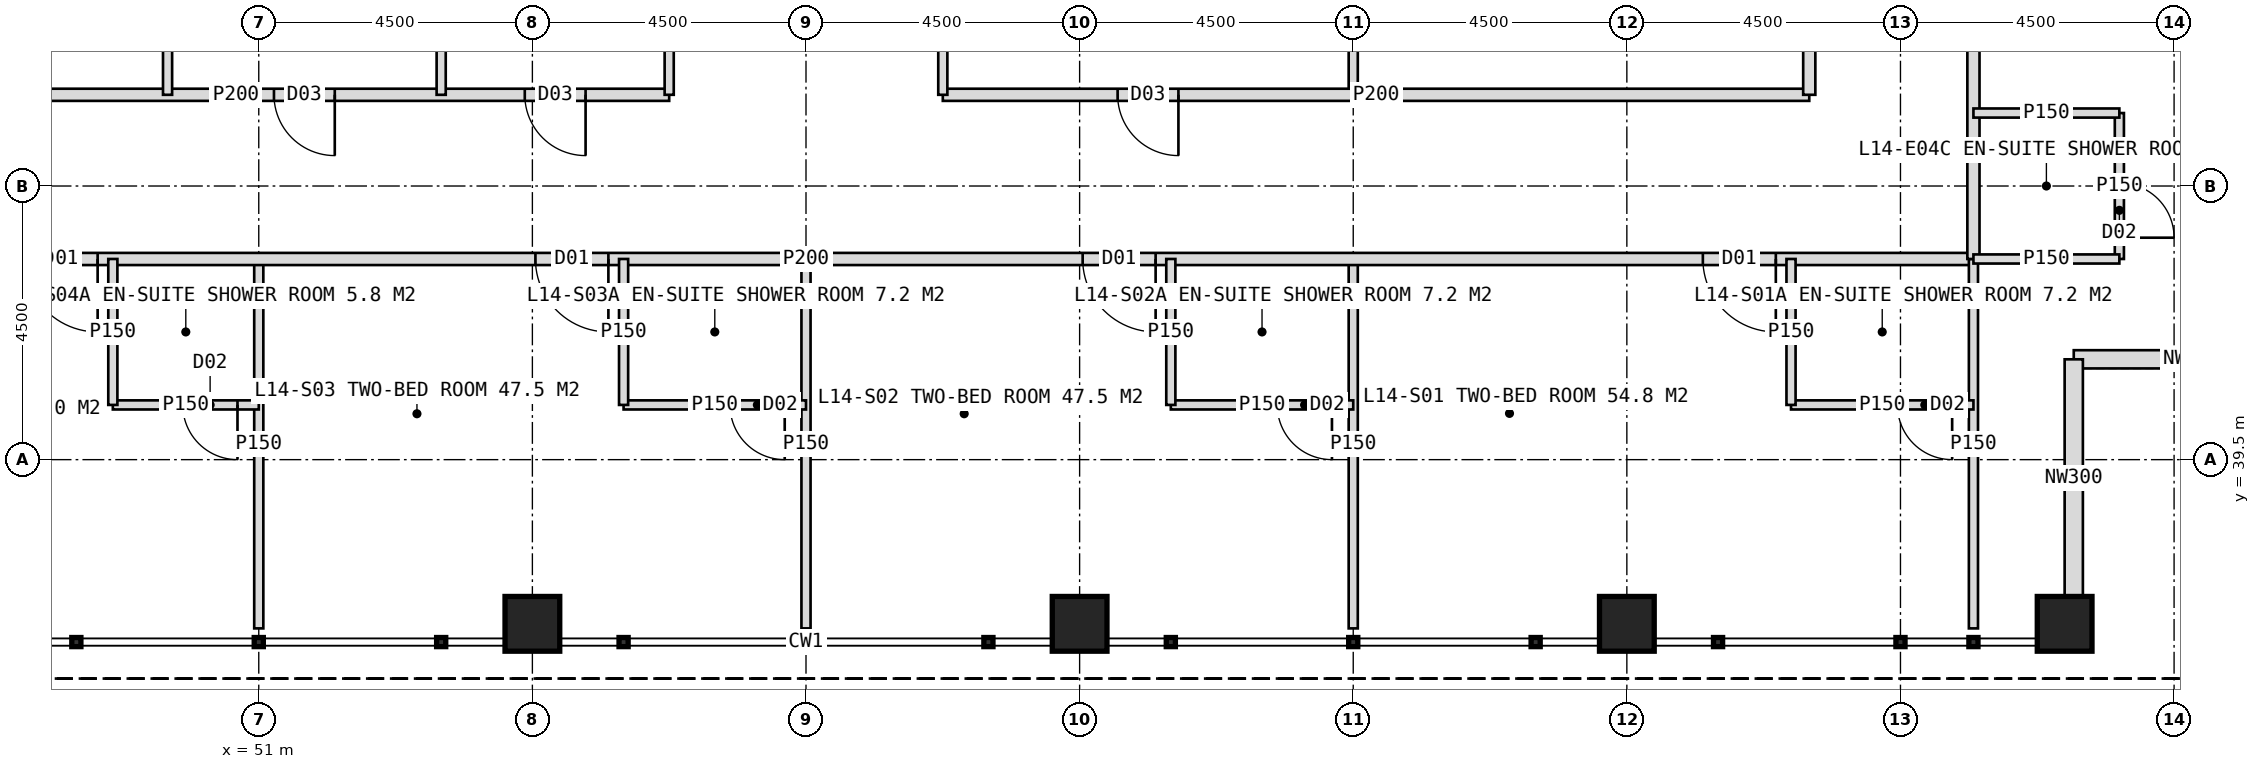
"""IFC4 building model, lengths in metres.
Left out: names, types, materials, properties, quantities, classifications, styles, units other than length and angle.
Written with IfcOpenShell. Run it as: python <this file> out.ifc"""

import sys

from ifc_helpers import new_model, si_unit, direction, frame, frame_2d, origin, origin_2d, place, context, subcontext, project, spatial, rectangle, hollow_rectangle, extrude, element, fill, save


model = new_model("IFC4")
c1 = context("Model", 3, precision=1e-05, world=origin(), true_north=direction((0.0, 1.0)))
c2 = subcontext(c1, "Body", "Model", "MODEL_VIEW")
j1 = project(units=[si_unit("LENGTHUNIT", "METRE"), si_unit("PLANEANGLEUNIT", "RADIAN")], contexts=[c1])
p1 = place(None, origin())
s1 = spatial("IfcSite", under=j1, at=p1, CompositionType="ELEMENT")
p2 = place(p1, origin())
s2 = spatial("IfcBuilding", under=s1, at=p2, CompositionType="ELEMENT")
p3 = place(p2, frame((0.0, 0.0, 63.0)))
s3 = spatial("IfcBuildingStorey", under=s2, at=p3, CompositionType="ELEMENT", Elevation=63.0)
for number, where, z_axis, x_axis in (
    (1, (55.5, 36.8, 0.0), (0.0, 0.0, 1.0), (1.0, 0.0, 0.0)),
    (2, (64.5, 36.8, 0.0), (0.0, 0.0, 1.0), (1.0, 0.0, 0.0)),
    (3, (73.5, 36.8, 0.0), (0.0, 0.0, 1.0), (1.0, 0.0, 0.0)),
    (4, (80.7, 36.8, 0.0), (0.0, 0.0, 1.0), (1.0, 0.0, 0.0)),
):
    element("IfcColumn", number, at=place(p3, frame(where, z_axis=z_axis, x_axis=x_axis)), inside=s3, PredefinedType="COLUMN", context=c2, shape_type="SweptSolid", body=[
        extrude(hollow_rectangle(XDim=0.9, YDim=0.9, WallThickness=0.08, at=origin_2d()), origin(), (0.0, 0.0, 1.0), 4.0),
    ])
for number, where, z_axis, x_axis in (
    (5, (84.75, 41.15, 0.0), (0.0, 0.0, 1.0), (-1.0, 0.0, 0.0)),
    (6, (80.85, 41.15, 0.0), (0.0, 0.0, 1.0), (0.0, -1.0, 0.0)),
):
    element("IfcWall", number, at=place(p3, frame(where, z_axis=z_axis, x_axis=x_axis)), inside=s3, PredefinedType="ELEMENTEDWALL", context=c2, shape_type="SweptSolid", body=[
        extrude(rectangle(XDim=3.9, YDim=0.3, at=frame_2d((1.95, 0.0))), origin(), (0.0, 0.0, 1.0), 2.95),
    ])
p4 = place(p3, frame((69.0, 42.8, 0.0), z_axis=(0.0, 0.0, 1.0), x_axis=(0.0, -1.0, 0.0)))
e7 = element("IfcWall", 7, at=p4, inside=s3, PredefinedType="PARTITIONING", context=c2, shape_type="SweptSolid", body=[
    extrude(rectangle(XDim=6.075, YDim=0.15, at=frame_2d((3.038, 0.0))), origin(), (0.0, 0.0, 1.0), 3.75),
])
p5 = place(p3, frame((60.0, 42.8, 0.0), z_axis=(0.0, 0.0, 1.0), x_axis=(0.0, -1.0, 0.0)))
e8 = element("IfcWall", 8, at=p5, inside=s3, PredefinedType="PARTITIONING", context=c2, shape_type="SweptSolid", body=[
    extrude(rectangle(XDim=6.075, YDim=0.15, at=frame_2d((3.038, 0.0))), origin(), (0.0, 0.0, 1.0), 2.75),
])
p6 = place(p3, frame((51.0, 42.8, 0.0), z_axis=(0.0, 0.0, 1.0), x_axis=(0.0, -1.0, 0.0)))
e9 = element("IfcWall", 9, at=p6, inside=s3, PredefinedType="PARTITIONING", context=c2, shape_type="SweptSolid", body=[
    extrude(rectangle(XDim=6.075, YDim=0.15, at=frame_2d((3.038, 0.0))), origin(), (0.0, 0.0, 1.0), 3.75),
])
p7 = place(p3, frame((79.2, 42.8, 0.0), z_axis=(0.0, 0.0, 1.0), x_axis=(-1.0, 0.0, 0.0)))
e10 = element("IfcWall", 10, at=p7, inside=s3, PredefinedType="PARTITIONING", context=c2, shape_type="SweptSolid", body=[
    extrude(rectangle(XDim=38.4, YDim=0.2, at=frame_2d((19.2, 0.0))), origin(), (0.0, 0.0, 1.0), 3.75),
])
p8 = place(p7, frame((3.25, 0.0, 0.0)))
e11 = element("IfcOpeningElement", 11, at=p8, cuts=e10, PredefinedType="OPENING", context=c2, shape_type="SweptSolid", body=[
    extrude(rectangle(XDim=1.2, YDim=2.2, at=frame_2d((0.6, 1.1))), frame((0.0, 0.11, 0.0), z_axis=(0.0, -1.0, 0.0), x_axis=(1.0, 0.0, 0.0)), (0.0, 0.0, 1.0), 0.22),
])
p9 = place(p7, frame((13.45, 0.0, 0.0)))
e12 = element("IfcOpeningElement", 12, at=p9, cuts=e10, PredefinedType="OPENING", context=c2, shape_type="SweptSolid", body=[
    extrude(rectangle(XDim=1.2, YDim=2.2, at=frame_2d((0.6, 1.1))), frame((0.0, 0.11, 0.0), z_axis=(0.0, -1.0, 0.0), x_axis=(1.0, 0.0, 0.0)), (0.0, 0.0, 1.0), 0.22),
])
p10 = place(p7, frame((22.45, 0.0, 0.0)))
e13 = element("IfcOpeningElement", 13, at=p10, cuts=e10, PredefinedType="OPENING", context=c2, shape_type="SweptSolid", body=[
    extrude(rectangle(XDim=1.2, YDim=2.2, at=frame_2d((0.6, 1.1))), frame((0.0, 0.11, 0.0), z_axis=(0.0, -1.0, 0.0), x_axis=(1.0, 0.0, 0.0)), (0.0, 0.0, 1.0), 0.22),
])
p11 = place(p7, frame((30.85, 0.0, 0.0)))
e14 = element("IfcOpeningElement", 14, at=p11, cuts=e10, PredefinedType="OPENING", context=c2, shape_type="SweptSolid", body=[
    extrude(rectangle(XDim=1.2, YDim=2.2, at=frame_2d((0.6, 1.1))), frame((0.0, 0.11, 0.0), z_axis=(0.0, -1.0, 0.0), x_axis=(1.0, 0.0, 0.0)), (0.0, 0.0, 1.0), 0.22),
])
p12 = place(p3, frame((79.2, 42.8, 0.0), z_axis=(0.0, 0.0, 1.0), x_axis=(0.0, -1.0, 0.0)))
e15 = element("IfcWall", 15, at=p12, inside=s3, PredefinedType="PARTITIONING", context=c2, shape_type="SweptSolid", body=[
    extrude(rectangle(XDim=6.075, YDim=0.15, at=frame_2d((3.038, 0.0))), origin(), (0.0, 0.0, 1.0), 3.75),
])
p13 = place(p3, frame((79.2, 40.4, 0.0), z_axis=(0.0, 0.0, 1.0), x_axis=(-1.0, 0.0, 0.0)))
e16 = element("IfcWall", 16, at=p13, inside=s3, PredefinedType="PARTITIONING", context=c2, shape_type="SweptSolid", body=[
    extrude(rectangle(XDim=3.0, YDim=0.15, at=frame_2d((1.5, 0.0))), origin(), (0.0, 0.0, 1.0), 3.75),
])
p14 = place(p13, frame((0.35, 0.0, 0.0)))
e17 = element("IfcOpeningElement", 17, at=p14, cuts=e16, PredefinedType="OPENING", context=c2, shape_type="SweptSolid", body=[
    extrude(rectangle(XDim=0.9, YDim=2.1, at=frame_2d((0.45, 1.05))), frame((0.0, 0.085, 0.0), z_axis=(0.0, -1.0, 0.0), x_axis=(1.0, 0.0, 0.0)), (0.0, 0.0, 1.0), 0.17),
])
p15 = place(p3, frame((76.2, 42.8, 0.0), z_axis=(0.0, 0.0, 1.0), x_axis=(0.0, -1.0, 0.0)))
e18 = element("IfcWall", 18, at=p15, inside=s3, PredefinedType="PARTITIONING", context=c2, shape_type="SweptSolid", body=[
    extrude(rectangle(XDim=2.4, YDim=0.15, at=frame_2d((1.2, 0.0))), origin(), (0.0, 0.0, 1.0), 3.75),
])
p16 = place(p3, frame((69.0, 40.4, 0.0), z_axis=(0.0, 0.0, 1.0), x_axis=(-1.0, 0.0, 0.0)))
e19 = element("IfcWall", 19, at=p16, inside=s3, PredefinedType="PARTITIONING", context=c2, shape_type="SweptSolid", body=[
    extrude(rectangle(XDim=3.0, YDim=0.15, at=frame_2d((1.5, 0.0))), origin(), (0.0, 0.0, 1.0), 3.75),
])
p17 = place(p16, frame((0.35, 0.0, 0.0)))
e20 = element("IfcOpeningElement", 20, at=p17, cuts=e19, PredefinedType="OPENING", context=c2, shape_type="SweptSolid", body=[
    extrude(rectangle(XDim=0.9, YDim=2.1, at=frame_2d((0.45, 1.05))), frame((0.0, 0.085, 0.0), z_axis=(0.0, -1.0, 0.0), x_axis=(1.0, 0.0, 0.0)), (0.0, 0.0, 1.0), 0.17),
])
p18 = place(p3, frame((66.0, 42.8, 0.0), z_axis=(0.0, 0.0, 1.0), x_axis=(0.0, -1.0, 0.0)))
e21 = element("IfcWall", 21, at=p18, inside=s3, PredefinedType="PARTITIONING", context=c2, shape_type="SweptSolid", body=[
    extrude(rectangle(XDim=2.4, YDim=0.15, at=frame_2d((1.2, 0.0))), origin(), (0.0, 0.0, 1.0), 3.75),
])
p19 = place(p3, frame((60.0, 40.4, 0.0), z_axis=(0.0, 0.0, 1.0), x_axis=(-1.0, 0.0, 0.0)))
e22 = element("IfcWall", 22, at=p19, inside=s3, PredefinedType="PARTITIONING", context=c2, shape_type="SweptSolid", body=[
    extrude(rectangle(XDim=3.0, YDim=0.15, at=frame_2d((1.5, 0.0))), origin(), (0.0, 0.0, 1.0), 3.75),
])
p20 = place(p19, frame((0.35, 0.0, 0.0)))
e23 = element("IfcOpeningElement", 23, at=p20, cuts=e22, PredefinedType="OPENING", context=c2, shape_type="SweptSolid", body=[
    extrude(rectangle(XDim=0.9, YDim=2.1, at=frame_2d((0.45, 1.05))), frame((0.0, 0.085, 0.0), z_axis=(0.0, -1.0, 0.0), x_axis=(1.0, 0.0, 0.0)), (0.0, 0.0, 1.0), 0.17),
])
p21 = place(p3, frame((57.0, 42.8, 0.0), z_axis=(0.0, 0.0, 1.0), x_axis=(0.0, -1.0, 0.0)))
e24 = element("IfcWall", 24, at=p21, inside=s3, PredefinedType="PARTITIONING", context=c2, shape_type="SweptSolid", body=[
    extrude(rectangle(XDim=2.4, YDim=0.15, at=frame_2d((1.2, 0.0))), origin(), (0.0, 0.0, 1.0), 3.75),
])
p22 = place(p3, frame((51.0, 40.4, 0.0), z_axis=(0.0, 0.0, 1.0), x_axis=(-1.0, 0.0, 0.0)))
e25 = element("IfcWall", 25, at=p22, inside=s3, PredefinedType="PARTITIONING", context=c2, shape_type="SweptSolid", body=[
    extrude(rectangle(XDim=2.4, YDim=0.15, at=frame_2d((1.2, 0.0))), origin(), (0.0, 0.0, 1.0), 3.75),
])
p23 = place(p22, frame((0.35, 0.0, 0.0)))
e26 = element("IfcOpeningElement", 26, at=p23, cuts=e25, PredefinedType="OPENING", context=c2, shape_type="SweptSolid", body=[
    extrude(rectangle(XDim=0.9, YDim=2.1, at=frame_2d((0.45, 1.05))), frame((0.0, 0.085, 0.0), z_axis=(0.0, -1.0, 0.0), x_axis=(1.0, 0.0, 0.0)), (0.0, 0.0, 1.0), 0.17),
])
p24 = place(p3, frame((48.6, 42.8, 0.0), z_axis=(0.0, 0.0, 1.0), x_axis=(0.0, -1.0, 0.0)))
e27 = element("IfcWall", 27, at=p24, inside=s3, PredefinedType="PARTITIONING", context=c2, shape_type="SweptSolid", body=[
    extrude(rectangle(XDim=2.4, YDim=0.15, at=frame_2d((1.2, 0.0))), origin(), (0.0, 0.0, 1.0), 3.75),
])
p25 = place(p3, frame((69.0, 53.0, 0.0), z_axis=(0.0, 0.0, 1.0), x_axis=(0.0, -1.0, 0.0)))
e28 = element("IfcWall", 28, at=p25, inside=s3, PredefinedType="PARTITIONING", context=c2, shape_type="SweptSolid", body=[
    extrude(rectangle(XDim=7.5, YDim=0.15, at=frame_2d((3.75, 0.0))), origin(), (0.0, 0.0, 1.0), 3.75),
])
p26 = place(p3, frame((76.5, 45.5, 0.0), z_axis=(0.0, 0.0, 1.0), x_axis=(-1.0, 0.0, 0.0)))
e29 = element("IfcWall", 29, at=p26, inside=s3, PredefinedType="PARTITIONING", context=c2, shape_type="SweptSolid", body=[
    extrude(rectangle(XDim=14.25, YDim=0.2, at=frame_2d((7.125, 0.0))), origin(), (0.0, 0.0, 1.0), 3.75),
])
p27 = place(p26, frame((10.375, 0.0, 0.0)))
e30 = element("IfcOpeningElement", 30, at=p27, cuts=e29, PredefinedType="OPENING", context=c2, shape_type="SweptSolid", body=[
    extrude(rectangle(XDim=1.0, YDim=2.1, at=frame_2d((0.5, 1.05))), frame((0.0, 0.11, 0.0), z_axis=(0.0, -1.0, 0.0), x_axis=(1.0, 0.0, 0.0)), (0.0, 0.0, 1.0), 0.22),
])
p28 = place(p3, frame((57.75, 45.5, 0.0), z_axis=(0.0, 0.0, 1.0), x_axis=(-1.0, 0.0, 0.0)))
e31 = element("IfcWall", 31, at=p28, inside=s3, PredefinedType="PARTITIONING", context=c2, shape_type="SweptSolid", body=[
    extrude(rectangle(XDim=14.25, YDim=0.2, at=frame_2d((7.125, 0.0))), origin(), (0.0, 0.0, 1.0), 3.75),
])
p29 = place(p28, frame((1.375, 0.0, 0.0)))
e32 = element("IfcOpeningElement", 32, at=p29, cuts=e31, PredefinedType="OPENING", context=c2, shape_type="SweptSolid", body=[
    extrude(rectangle(XDim=1.0, YDim=2.1, at=frame_2d((0.5, 1.05))), frame((0.0, 0.11, 0.0), z_axis=(0.0, -1.0, 0.0), x_axis=(1.0, 0.0, 0.0)), (0.0, 0.0, 1.0), 0.22),
])
p30 = place(p28, frame((5.5, 0.0, 0.0)))
e33 = element("IfcOpeningElement", 33, at=p30, cuts=e31, PredefinedType="OPENING", context=c2, shape_type="SweptSolid", body=[
    extrude(rectangle(XDim=1.0, YDim=2.1, at=frame_2d((0.5, 1.05))), frame((0.0, 0.11, 0.0), z_axis=(0.0, -1.0, 0.0), x_axis=(1.0, 0.0, 0.0)), (0.0, 0.0, 1.0), 0.22),
])
p31 = place(p28, frame((10.75, 0.0, 0.0)))
e34 = element("IfcOpeningElement", 34, at=p31, cuts=e31, PredefinedType="OPENING", context=c2, shape_type="SweptSolid", body=[
    extrude(rectangle(XDim=1.0, YDim=2.1, at=frame_2d((0.5, 1.05))), frame((0.0, 0.11, 0.0), z_axis=(0.0, -1.0, 0.0), x_axis=(1.0, 0.0, 0.0)), (0.0, 0.0, 1.0), 0.22),
])
for number, where, z_axis, x_axis in (
    (35, (62.25, 53.0, 0.0), (0.0, 0.0, 1.0), (0.0, -1.0, 0.0)),
    (36, (57.75, 53.0, 0.0), (0.0, 0.0, 1.0), (0.0, -1.0, 0.0)),
    (37, (54.0, 53.0, 0.0), (0.0, 0.0, 1.0), (0.0, -1.0, 0.0)),
    (38, (49.5, 53.0, 0.0), (0.0, 0.0, 1.0), (0.0, -1.0, 0.0)),
):
    element("IfcWall", number, at=place(p3, frame(where, z_axis=z_axis, x_axis=x_axis)), inside=s3, PredefinedType="PARTITIONING", context=c2, shape_type="SweptSolid", body=[
        extrude(rectangle(XDim=7.5, YDim=0.15, at=frame_2d((3.75, 0.0))), origin(), (0.0, 0.0, 1.0), 3.75),
    ])
p32 = place(p3, frame((79.2, 81.2, 0.0), z_axis=(0.0, 0.0, 1.0), x_axis=(0.0, -1.0, 0.0)))
e39 = element("IfcWall", 39, at=p32, inside=s3, PredefinedType="PARTITIONING", context=c2, shape_type="SweptSolid", body=[
    extrude(rectangle(XDim=38.4, YDim=0.2, at=frame_2d((19.2, 0.0))), origin(), (0.0, 0.0, 1.0), 3.75),
])
p33 = place(p32, frame((3.25, 0.0, 0.0)))
e40 = element("IfcOpeningElement", 40, at=p33, cuts=e39, PredefinedType="OPENING", context=c2, shape_type="SweptSolid", body=[
    extrude(rectangle(XDim=1.2, YDim=2.2, at=frame_2d((0.6, 1.1))), frame((0.0, 0.11, 0.0), z_axis=(0.0, -1.0, 0.0), x_axis=(1.0, 0.0, 0.0)), (0.0, 0.0, 1.0), 0.22),
])
p34 = place(p32, frame((13.45, 0.0, 0.0)))
e41 = element("IfcOpeningElement", 41, at=p34, cuts=e39, PredefinedType="OPENING", context=c2, shape_type="SweptSolid", body=[
    extrude(rectangle(XDim=1.2, YDim=2.2, at=frame_2d((0.6, 1.1))), frame((0.0, 0.11, 0.0), z_axis=(0.0, -1.0, 0.0), x_axis=(1.0, 0.0, 0.0)), (0.0, 0.0, 1.0), 0.22),
])
p35 = place(p32, frame((21.85, 0.0, 0.0)))
e42 = element("IfcOpeningElement", 42, at=p35, cuts=e39, PredefinedType="OPENING", context=c2, shape_type="SweptSolid", body=[
    extrude(rectangle(XDim=1.2, YDim=2.2, at=frame_2d((0.6, 1.1))), frame((0.0, 0.11, 0.0), z_axis=(0.0, -1.0, 0.0), x_axis=(1.0, 0.0, 0.0)), (0.0, 0.0, 1.0), 0.22),
])
p36 = place(p32, frame((27.85, 0.0, 0.0)))
e43 = element("IfcOpeningElement", 43, at=p36, cuts=e39, PredefinedType="OPENING", context=c2, shape_type="SweptSolid", body=[
    extrude(rectangle(XDim=1.2, YDim=2.2, at=frame_2d((0.6, 1.1))), frame((0.0, 0.11, 0.0), z_axis=(0.0, -1.0, 0.0), x_axis=(1.0, 0.0, 0.0)), (0.0, 0.0, 1.0), 0.22),
])
p37 = place(p3, frame((81.6, 45.2, 0.0), z_axis=(0.0, 0.0, 1.0), x_axis=(0.0, -1.0, 0.0)))
e44 = element("IfcWall", 44, at=p37, inside=s3, PredefinedType="PARTITIONING", context=c2, shape_type="SweptSolid", body=[
    extrude(rectangle(XDim=2.4, YDim=0.15, at=frame_2d((1.2, 0.0))), origin(), (0.0, 0.0, 1.0), 3.75),
])
p38 = place(p37, frame((1.15, 0.0, 0.0)))
e45 = element("IfcOpeningElement", 45, at=p38, cuts=e44, PredefinedType="OPENING", context=c2, shape_type="SweptSolid", body=[
    extrude(rectangle(XDim=0.9, YDim=2.1, at=frame_2d((0.45, 1.05))), frame((0.0, 0.085, 0.0), z_axis=(0.0, -1.0, 0.0), x_axis=(1.0, 0.0, 0.0)), (0.0, 0.0, 1.0), 0.17),
])
for number, where, z_axis, x_axis in (
    (46, (79.2, 45.2, 0.0), (0.0, 0.0, 1.0), (1.0, 0.0, 0.0)),
    (47, (79.2, 42.8, 0.0), (0.0, 0.0, 1.0), (1.0, 0.0, 0.0)),
):
    element("IfcWall", number, at=place(p3, frame(where, z_axis=z_axis, x_axis=x_axis)), inside=s3, PredefinedType="PARTITIONING", context=c2, shape_type="SweptSolid", body=[
        extrude(rectangle(XDim=2.4, YDim=0.15, at=frame_2d((1.2, 0.0))), origin(), (0.0, 0.0, 1.0), 3.75),
    ])
p39 = place(p3, frame((76.5, 62.0, 0.0), z_axis=(0.0, 0.0, 1.0), x_axis=(0.0, -1.0, 0.0)))
e48 = element("IfcWall", 48, at=p39, inside=s3, PredefinedType="PARTITIONING", context=c2, shape_type="SweptSolid", body=[
    extrude(rectangle(XDim=16.5, YDim=0.2, at=frame_2d((8.25, 0.0))), origin(), (0.0, 0.0, 1.0), 3.75),
])
p40 = place(p39, frame((4.0, 0.0, 0.0)))
e49 = element("IfcOpeningElement", 49, at=p40, cuts=e48, PredefinedType="OPENING", context=c2, shape_type="SweptSolid", body=[
    extrude(rectangle(XDim=1.0, YDim=2.1, at=frame_2d((0.5, 1.05))), frame((0.0, 0.11, 0.0), z_axis=(0.0, -1.0, 0.0), x_axis=(1.0, 0.0, 0.0)), (0.0, 0.0, 1.0), 0.22),
])
p41 = place(p39, frame((12.25, 0.0, 0.0)))
e50 = element("IfcOpeningElement", 50, at=p41, cuts=e48, PredefinedType="OPENING", context=c2, shape_type="SweptSolid", body=[
    extrude(rectangle(XDim=1.0, YDim=2.1, at=frame_2d((0.5, 1.05))), frame((0.0, 0.11, 0.0), z_axis=(0.0, -1.0, 0.0), x_axis=(1.0, 0.0, 0.0)), (0.0, 0.0, 1.0), 0.22),
])
p42 = place(p8, origin())
e51 = element("IfcDoor", 51, at=p42, inside=s3, OperationType="SINGLE_SWING_LEFT", PredefinedType="DOOR", context=c2, shape_type="SweptSolid", body=[
    extrude(rectangle(XDim=1.2, YDim=2.2, at=frame_2d((0.6, 1.1))), frame((0.0, 0.025, 0.0), z_axis=(0.0, -1.0, 0.0), x_axis=(1.0, 0.0, 0.0)), (0.0, 0.0, 1.0), 0.05),
])
fill(e11, e51)
p43 = place(p14, origin())
e52 = element("IfcDoor", 52, at=p43, inside=s3, OperationType="SINGLE_SWING_LEFT", PredefinedType="DOOR", context=c2, shape_type="SweptSolid", body=[
    extrude(rectangle(XDim=0.9, YDim=2.1, at=frame_2d((0.45, 1.05))), frame((0.0, 0.025, 0.0), z_axis=(0.0, -1.0, 0.0), x_axis=(1.0, 0.0, 0.0)), (0.0, 0.0, 1.0), 0.05),
])
fill(e17, e52)
p44 = place(p9, origin())
e53 = element("IfcDoor", 53, at=p44, inside=s3, OperationType="SINGLE_SWING_LEFT", PredefinedType="DOOR", context=c2, shape_type="SweptSolid", body=[
    extrude(rectangle(XDim=1.2, YDim=2.2, at=frame_2d((0.6, 1.1))), frame((0.0, 0.025, 0.0), z_axis=(0.0, -1.0, 0.0), x_axis=(1.0, 0.0, 0.0)), (0.0, 0.0, 1.0), 0.05),
])
fill(e12, e53)
p45 = place(p17, origin())
e54 = element("IfcDoor", 54, at=p45, inside=s3, OperationType="SINGLE_SWING_LEFT", PredefinedType="DOOR", context=c2, shape_type="SweptSolid", body=[
    extrude(rectangle(XDim=0.9, YDim=2.1, at=frame_2d((0.45, 1.05))), frame((0.0, 0.025, 0.0), z_axis=(0.0, -1.0, 0.0), x_axis=(1.0, 0.0, 0.0)), (0.0, 0.0, 1.0), 0.05),
])
fill(e20, e54)
p46 = place(p10, origin())
e55 = element("IfcDoor", 55, at=p46, inside=s3, OperationType="SINGLE_SWING_LEFT", PredefinedType="DOOR", context=c2, shape_type="SweptSolid", body=[
    extrude(rectangle(XDim=1.2, YDim=2.2, at=frame_2d((0.6, 1.1))), frame((0.0, 0.025, 0.0), z_axis=(0.0, -1.0, 0.0), x_axis=(1.0, 0.0, 0.0)), (0.0, 0.0, 1.0), 0.05),
])
fill(e13, e55)
p47 = place(p20, origin())
e56 = element("IfcDoor", 56, at=p47, inside=s3, OperationType="SINGLE_SWING_LEFT", PredefinedType="DOOR", context=c2, shape_type="SweptSolid", body=[
    extrude(rectangle(XDim=0.9, YDim=2.1, at=frame_2d((0.45, 1.05))), frame((0.0, 0.025, 0.0), z_axis=(0.0, -1.0, 0.0), x_axis=(1.0, 0.0, 0.0)), (0.0, 0.0, 1.0), 0.05),
])
fill(e23, e56)
p48 = place(p11, origin())
e57 = element("IfcDoor", 57, at=p48, inside=s3, OperationType="SINGLE_SWING_LEFT", PredefinedType="DOOR", context=c2, shape_type="SweptSolid", body=[
    extrude(rectangle(XDim=1.2, YDim=2.2, at=frame_2d((0.6, 1.1))), frame((0.0, 0.025, 0.0), z_axis=(0.0, -1.0, 0.0), x_axis=(1.0, 0.0, 0.0)), (0.0, 0.0, 1.0), 0.05),
])
fill(e14, e57)
p49 = place(p23, origin())
e58 = element("IfcDoor", 58, at=p49, inside=s3, OperationType="SINGLE_SWING_LEFT", PredefinedType="DOOR", context=c2, shape_type="SweptSolid", body=[
    extrude(rectangle(XDim=0.9, YDim=2.1, at=frame_2d((0.45, 1.05))), frame((0.0, 0.025, 0.0), z_axis=(0.0, -1.0, 0.0), x_axis=(1.0, 0.0, 0.0)), (0.0, 0.0, 1.0), 0.05),
])
fill(e26, e58)
p50 = place(p27, origin())
e59 = element("IfcDoor", 59, at=p50, inside=s3, OperationType="SINGLE_SWING_LEFT", PredefinedType="DOOR", context=c2, shape_type="SweptSolid", body=[
    extrude(rectangle(XDim=1.0, YDim=2.1, at=frame_2d((0.5, 1.05))), frame((0.0, 0.025, 0.0), z_axis=(0.0, -1.0, 0.0), x_axis=(1.0, 0.0, 0.0)), (0.0, 0.0, 1.0), 0.05),
])
fill(e30, e59)
p51 = place(p29, origin())
e60 = element("IfcDoor", 60, at=p51, inside=s3, OperationType="SINGLE_SWING_LEFT", PredefinedType="DOOR", context=c2, shape_type="SweptSolid", body=[
    extrude(rectangle(XDim=1.0, YDim=2.1, at=frame_2d((0.5, 1.05))), frame((0.0, 0.025, 0.0), z_axis=(0.0, -1.0, 0.0), x_axis=(1.0, 0.0, 0.0)), (0.0, 0.0, 1.0), 0.05),
])
fill(e32, e60)
p52 = place(p30, origin())
e61 = element("IfcDoor", 61, at=p52, inside=s3, OperationType="SINGLE_SWING_LEFT", PredefinedType="DOOR", context=c2, shape_type="SweptSolid", body=[
    extrude(rectangle(XDim=1.0, YDim=2.1, at=frame_2d((0.5, 1.05))), frame((0.0, 0.025, 0.0), z_axis=(0.0, -1.0, 0.0), x_axis=(1.0, 0.0, 0.0)), (0.0, 0.0, 1.0), 0.05),
])
fill(e33, e61)
p53 = place(p38, origin())
e62 = element("IfcDoor", 62, at=p53, inside=s3, OperationType="SINGLE_SWING_RIGHT", PredefinedType="DOOR", context=c2, shape_type="SweptSolid", body=[
    extrude(rectangle(XDim=0.9, YDim=2.1, at=frame_2d((0.45, 1.05))), frame((0.0, 0.025, 0.0), z_axis=(0.0, -1.0, 0.0), x_axis=(1.0, 0.0, 0.0)), (0.0, 0.0, 1.0), 0.05),
])
fill(e45, e62)
save(model, sys.argv[1])
